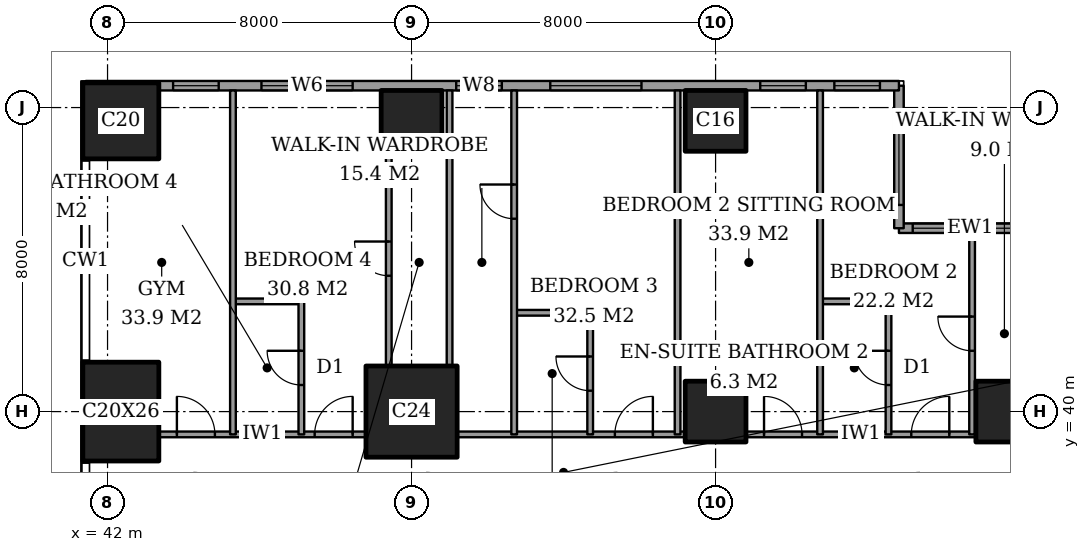
"""IFC4 building model, lengths in metres.
Left out: names, types, materials, properties, quantities, classifications, styles, units other than length and angle.
Written with IfcOpenShell. Run it as: python <this file> out.ifc"""

import sys

from ifc_helpers import new_model, si_unit, direction, frame, frame_2d, origin, origin_2d, place, context, subcontext, project, spatial, rectangle, extrude, element, fill, save


model = new_model("IFC4")
c1 = context("Model", 3, precision=1e-05, world=origin(), true_north=direction((0.0, 1.0)))
c2 = subcontext(c1, "Body", "Model", "MODEL_VIEW")
j1 = project(units=[si_unit("LENGTHUNIT", "METRE"), si_unit("PLANEANGLEUNIT", "RADIAN")], contexts=[c1])
p1 = place(None, origin())
s1 = spatial("IfcSite", under=j1, at=p1, CompositionType="ELEMENT")
p2 = place(p1, origin())
s2 = spatial("IfcBuilding", under=s1, at=p2, CompositionType="ELEMENT")
p3 = place(p2, frame((0.0, 0.0, 252.0)))
s3 = spatial("IfcBuildingStorey", under=s2, at=p3, CompositionType="ELEMENT", Elevation=252.0)
p4 = place(p3, frame((42.35, 40.0, 0.0), z_axis=(0.0, 0.0, 1.0), x_axis=(1.0, 0.0, 0.0)))
e1 = element("IfcColumn", 1, at=p4, inside=s3, PredefinedType="COLUMN", context=c2, shape_type="SweptSolid", body=[
    extrude(rectangle(XDim=2.0, YDim=2.6, at=origin_2d()), origin(), (0.0, 0.0, 1.0), 3.6),
])
p5 = place(p3, frame((42.35, 47.65, 0.0), z_axis=(0.0, 0.0, 1.0), x_axis=(1.0, 0.0, 0.0)))
e2 = element("IfcColumn", 2, at=p5, inside=s3, PredefinedType="COLUMN", context=c2, shape_type="SweptSolid", body=[
    extrude(rectangle(XDim=2.0, YDim=2.0, at=origin_2d()), origin(), (0.0, 0.0, 1.0), 3.6),
])
p6 = place(p3, frame((50.0, 40.0, 0.0), z_axis=(0.0, 0.0, 1.0), x_axis=(1.0, 0.0, 0.0)))
e3 = element("IfcColumn", 3, at=p6, inside=s3, PredefinedType="COLUMN", context=c2, shape_type="SweptSolid", body=[
    extrude(rectangle(XDim=2.4, YDim=2.4, at=origin_2d()), origin(), (0.0, 0.0, 1.0), 3.6),
])
for number, where, z_axis, x_axis in (
    (4, (50.0, 47.65, 0.0), (0.0, 0.0, 1.0), (1.0, 0.0, 0.0)),
    (5, (58.0, 40.0, 0.0), (0.0, 0.0, 1.0), (1.0, 0.0, 0.0)),
    (6, (58.0, 47.65, 0.0), (0.0, 0.0, 1.0), (1.0, 0.0, 0.0)),
    (7, (65.65, 40.0, 0.0), (0.0, 0.0, 1.0), (1.0, 0.0, 0.0)),
):
    element("IfcColumn", number, at=place(p3, frame(where, z_axis=z_axis, x_axis=x_axis)), inside=s3, PredefinedType="COLUMN", context=c2, shape_type="SweptSolid", body=[
        extrude(rectangle(XDim=1.6, YDim=1.6, at=origin_2d()), origin(), (0.0, 0.0, 1.0), 3.6),
    ])
p7 = place(p3, frame((66.575, 44.825, 0.0), z_axis=(0.0, 0.0, 1.0), x_axis=(-1.0, 0.0, 0.0)))
e8 = element("IfcWall", 8, at=p7, inside=s3, PredefinedType="SOLIDWALL", context=c2, shape_type="SweptSolid", body=[
    extrude(rectangle(XDim=3.75, YDim=0.25, at=frame_2d((1.875, 0.0))), origin(), (0.0, 0.0, 1.0), 3.6),
])
p8 = place(p7, frame((0.45, 0.0, 0.6)))
e9 = element("IfcOpeningElement", 9, at=p8, cuts=e8, PredefinedType="OPENING", context=c2, shape_type="SweptSolid", body=[
    extrude(rectangle(XDim=1.2, YDim=2.0, at=frame_2d((0.6, 1.0))), frame((0.0, 0.135, 0.0), z_axis=(0.0, -1.0, 0.0), x_axis=(1.0, 0.0, 0.0)), (0.0, 0.0, 1.0), 0.27),
])
p9 = place(p7, frame((2.188, 0.0, 0.6)))
e10 = element("IfcOpeningElement", 10, at=p9, cuts=e8, PredefinedType="OPENING", context=c2, shape_type="SweptSolid", body=[
    extrude(rectangle(XDim=1.2, YDim=2.0, at=frame_2d((0.6, 1.0))), frame((0.0, 0.135, 0.0), z_axis=(0.0, -1.0, 0.0), x_axis=(1.0, 0.0, 0.0)), (0.0, 0.0, 1.0), 0.27),
])
p10 = place(p3, frame((62.825, 44.825, 0.0), z_axis=(0.0, 0.0, 1.0), x_axis=(0.0, 1.0, 0.0)))
e11 = element("IfcWall", 11, at=p10, inside=s3, PredefinedType="SOLIDWALL", context=c2, shape_type="SweptSolid", body=[
    extrude(rectangle(XDim=3.75, YDim=0.25, at=frame_2d((1.875, 0.0))), origin(), (0.0, 0.0, 1.0), 3.6),
])
p11 = place(p10, frame((0.613, 0.0, 0.6)))
e12 = element("IfcOpeningElement", 12, at=p11, cuts=e11, PredefinedType="OPENING", context=c2, shape_type="SweptSolid", body=[
    extrude(rectangle(XDim=2.4, YDim=2.0, at=frame_2d((1.2, 1.0))), frame((0.0, 0.135, 0.0), z_axis=(0.0, -1.0, 0.0), x_axis=(1.0, 0.0, 0.0)), (0.0, 0.0, 1.0), 0.27),
])
p12 = place(p3, frame((62.825, 48.575, 0.0), z_axis=(0.0, 0.0, 1.0), x_axis=(-1.0, 0.0, 0.0)))
e13 = element("IfcWall", 13, at=p12, inside=s3, PredefinedType="SOLIDWALL", context=c2, shape_type="SweptSolid", body=[
    extrude(rectangle(XDim=21.4, YDim=0.25, at=frame_2d((10.7, 0.0))), origin(), (0.0, 0.0, 1.0), 3.6),
])
p13 = place(p12, frame((0.5, 0.0, 0.6)))
e14 = element("IfcOpeningElement", 14, at=p13, cuts=e13, PredefinedType="OPENING", context=c2, shape_type="SweptSolid", body=[
    extrude(rectangle(XDim=1.2, YDim=2.0, at=frame_2d((0.6, 1.0))), frame((0.0, 0.135, 0.0), z_axis=(0.0, -1.0, 0.0), x_axis=(1.0, 0.0, 0.0)), (0.0, 0.0, 1.0), 0.27),
])
p14 = place(p12, frame((2.45, 0.0, 0.6)))
e15 = element("IfcOpeningElement", 15, at=p14, cuts=e13, PredefinedType="OPENING", context=c2, shape_type="SweptSolid", body=[
    extrude(rectangle(XDim=1.2, YDim=2.0, at=frame_2d((0.6, 1.0))), frame((0.0, 0.135, 0.0), z_axis=(0.0, -1.0, 0.0), x_axis=(1.0, 0.0, 0.0)), (0.0, 0.0, 1.0), 0.27),
])
p15 = place(p12, frame((6.775, 0.0, 0.6)))
e16 = element("IfcOpeningElement", 16, at=p15, cuts=e13, PredefinedType="OPENING", context=c2, shape_type="SweptSolid", body=[
    extrude(rectangle(XDim=2.4, YDim=2.0, at=frame_2d((1.2, 1.0))), frame((0.0, 0.135, 0.0), z_axis=(0.0, -1.0, 0.0), x_axis=(1.0, 0.0, 0.0)), (0.0, 0.0, 1.0), 0.27),
])
p16 = place(p12, frame((10.45, 0.0, 0.6)))
e17 = element("IfcOpeningElement", 17, at=p16, cuts=e13, PredefinedType="OPENING", context=c2, shape_type="SweptSolid", body=[
    extrude(rectangle(XDim=1.2, YDim=2.0, at=frame_2d((0.6, 1.0))), frame((0.0, 0.135, 0.0), z_axis=(0.0, -1.0, 0.0), x_axis=(1.0, 0.0, 0.0)), (0.0, 0.0, 1.0), 0.27),
])
p17 = place(p12, frame((14.375, 0.0, 0.6)))
e18 = element("IfcOpeningElement", 18, at=p17, cuts=e13, PredefinedType="OPENING", context=c2, shape_type="SweptSolid", body=[
    extrude(rectangle(XDim=2.4, YDim=2.0, at=frame_2d((1.2, 1.0))), frame((0.0, 0.135, 0.0), z_axis=(0.0, -1.0, 0.0), x_axis=(1.0, 0.0, 0.0)), (0.0, 0.0, 1.0), 0.27),
])
p18 = place(p12, frame((17.9, 0.0, 0.6)))
e19 = element("IfcOpeningElement", 19, at=p18, cuts=e13, PredefinedType="OPENING", context=c2, shape_type="SweptSolid", body=[
    extrude(rectangle(XDim=1.2, YDim=2.0, at=frame_2d((0.6, 1.0))), frame((0.0, 0.135, 0.0), z_axis=(0.0, -1.0, 0.0), x_axis=(1.0, 0.0, 0.0)), (0.0, 0.0, 1.0), 0.27),
])
p19 = place(p3, frame((43.35, 39.4, 0.0), z_axis=(0.0, 0.0, 1.0), x_axis=(1.0, 0.0, 0.0)))
e20 = element("IfcWall", 20, at=p19, inside=s3, PredefinedType="PARTITIONING", context=c2, shape_type="SweptSolid", body=[
    extrude(rectangle(XDim=5.45, YDim=0.15, at=frame_2d((2.725, 0.0))), origin(), (0.0, 0.0, 1.0), 3.35),
])
p20 = place(p19, frame((4.1, 0.0, 0.0)))
e21 = element("IfcOpeningElement", 21, at=p20, cuts=e20, PredefinedType="OPENING", context=c2, shape_type="SweptSolid", body=[
    extrude(rectangle(XDim=1.0, YDim=2.1, at=frame_2d((0.5, 1.05))), frame((0.0, 0.085, 0.0), z_axis=(0.0, -1.0, 0.0), x_axis=(1.0, 0.0, 0.0)), (0.0, 0.0, 1.0), 0.17),
])
p21 = place(p19, frame((0.475, 0.0, 0.0)))
e22 = element("IfcOpeningElement", 22, at=p21, cuts=e20, PredefinedType="OPENING", context=c2, shape_type="SweptSolid", body=[
    extrude(rectangle(XDim=1.0, YDim=2.1, at=frame_2d((0.5, 1.05))), frame((0.0, 0.085, 0.0), z_axis=(0.0, -1.0, 0.0), x_axis=(1.0, 0.0, 0.0)), (0.0, 0.0, 1.0), 0.17),
])
p22 = place(p3, frame((51.2, 39.4, 0.0), z_axis=(0.0, 0.0, 1.0), x_axis=(1.0, 0.0, 0.0)))
e23 = element("IfcWall", 23, at=p22, inside=s3, PredefinedType="PARTITIONING", context=c2, shape_type="SweptSolid", body=[
    extrude(rectangle(XDim=6.0, YDim=0.15, at=frame_2d((3.0, 0.0))), origin(), (0.0, 0.0, 1.0), 3.35),
])
p23 = place(p22, frame((4.15, 0.0, 0.0)))
e24 = element("IfcOpeningElement", 24, at=p23, cuts=e23, PredefinedType="OPENING", context=c2, shape_type="SweptSolid", body=[
    extrude(rectangle(XDim=1.0, YDim=2.1, at=frame_2d((0.5, 1.05))), frame((0.0, 0.085, 0.0), z_axis=(0.0, -1.0, 0.0), x_axis=(1.0, 0.0, 0.0)), (0.0, 0.0, 1.0), 0.17),
])
p24 = place(p3, frame((58.8, 39.4, 0.0), z_axis=(0.0, 0.0, 1.0), x_axis=(1.0, 0.0, 0.0)))
e25 = element("IfcWall", 25, at=p24, inside=s3, PredefinedType="PARTITIONING", context=c2, shape_type="SweptSolid", body=[
    extrude(rectangle(XDim=6.05, YDim=0.15, at=frame_2d((3.025, 0.0))), origin(), (0.0, 0.0, 1.0), 3.35),
])
p25 = place(p24, frame((4.35, 0.0, 0.0)))
e26 = element("IfcOpeningElement", 26, at=p25, cuts=e25, PredefinedType="OPENING", context=c2, shape_type="SweptSolid", body=[
    extrude(rectangle(XDim=1.0, YDim=2.1, at=frame_2d((0.5, 1.05))), frame((0.0, 0.085, 0.0), z_axis=(0.0, -1.0, 0.0), x_axis=(1.0, 0.0, 0.0)), (0.0, 0.0, 1.0), 0.17),
])
p26 = place(p24, frame((0.475, 0.0, 0.0)))
e27 = element("IfcOpeningElement", 27, at=p26, cuts=e25, PredefinedType="OPENING", context=c2, shape_type="SweptSolid", body=[
    extrude(rectangle(XDim=1.0, YDim=2.1, at=frame_2d((0.5, 1.05))), frame((0.0, 0.085, 0.0), z_axis=(0.0, -1.0, 0.0), x_axis=(1.0, 0.0, 0.0)), (0.0, 0.0, 1.0), 0.17),
])
p27 = place(p3, frame((52.7, 42.6, 0.0), z_axis=(0.0, 0.0, 1.0), x_axis=(1.0, 0.0, 0.0)))
e28 = element("IfcWall", 28, at=p27, inside=s3, PredefinedType="PARTITIONING", context=c2, shape_type="SweptSolid", body=[
    extrude(rectangle(XDim=2.0, YDim=0.15, at=frame_2d((1.0, 0.0))), origin(), (0.0, 0.0, 1.0), 3.35),
])
for number, where, z_axis, x_axis in (
    (29, (45.3, 42.9, 0.0), (0.0, 0.0, 1.0), (1.0, 0.0, 0.0)),
    (30, (60.75, 42.9, 0.0), (0.0, 0.0, 1.0), (1.0, 0.0, 0.0)),
):
    element("IfcWall", number, at=place(p3, frame(where, z_axis=z_axis, x_axis=x_axis)), inside=s3, PredefinedType="PARTITIONING", context=c2, shape_type="SweptSolid", body=[
        extrude(rectangle(XDim=1.8, YDim=0.15, at=frame_2d((0.9, 0.0))), origin(), (0.0, 0.0, 1.0), 3.35),
    ])
p28 = place(p3, frame((45.3, 39.4, 0.0), z_axis=(0.0, 0.0, 1.0), x_axis=(0.0, 1.0, 0.0)))
e31 = element("IfcWall", 31, at=p28, inside=s3, PredefinedType="PARTITIONING", context=c2, shape_type="SweptSolid", body=[
    extrude(rectangle(XDim=9.05, YDim=0.15, at=frame_2d((4.525, 0.0))), origin(), (0.0, 0.0, 1.0), 3.35),
])
p29 = place(p3, frame((47.1, 39.4, 0.0), z_axis=(0.0, 0.0, 1.0), x_axis=(0.0, 1.0, 0.0)))
e32 = element("IfcWall", 32, at=p29, inside=s3, PredefinedType="PARTITIONING", context=c2, shape_type="SweptSolid", body=[
    extrude(rectangle(XDim=3.5, YDim=0.15, at=frame_2d((1.75, 0.0))), origin(), (0.0, 0.0, 1.0), 3.35),
])
p30 = place(p29, frame((1.3, 0.0, 0.0)))
e33 = element("IfcOpeningElement", 33, at=p30, cuts=e32, PredefinedType="OPENING", context=c2, shape_type="SweptSolid", body=[
    extrude(rectangle(XDim=0.9, YDim=2.1, at=frame_2d((0.45, 1.05))), frame((0.0, 0.085, 0.0), z_axis=(0.0, -1.0, 0.0), x_axis=(1.0, 0.0, 0.0)), (0.0, 0.0, 1.0), 0.17),
])
p31 = place(p3, frame((49.4, 41.2, 0.0), z_axis=(0.0, 0.0, 1.0), x_axis=(0.0, 1.0, 0.0)))
e34 = element("IfcWall", 34, at=p31, inside=s3, PredefinedType="PARTITIONING", context=c2, shape_type="SweptSolid", body=[
    extrude(rectangle(XDim=5.65, YDim=0.15, at=frame_2d((2.825, 0.0))), origin(), (0.0, 0.0, 1.0), 3.35),
])
p32 = place(p31, frame((2.375, 0.0, 0.0)))
e35 = element("IfcOpeningElement", 35, at=p32, cuts=e34, PredefinedType="OPENING", context=c2, shape_type="SweptSolid", body=[
    extrude(rectangle(XDim=0.9, YDim=2.1, at=frame_2d((0.45, 1.05))), frame((0.0, 0.085, 0.0), z_axis=(0.0, -1.0, 0.0), x_axis=(1.0, 0.0, 0.0)), (0.0, 0.0, 1.0), 0.17),
])
p33 = place(p3, frame((51.0, 41.2, 0.0), z_axis=(0.0, 0.0, 1.0), x_axis=(0.0, 1.0, 0.0)))
e36 = element("IfcWall", 36, at=p33, inside=s3, PredefinedType="PARTITIONING", context=c2, shape_type="SweptSolid", body=[
    extrude(rectangle(XDim=7.25, YDim=0.15, at=frame_2d((3.625, 0.0))), origin(), (0.0, 0.0, 1.0), 3.35),
])
p34 = place(p3, frame((52.7, 39.4, 0.0), z_axis=(0.0, 0.0, 1.0), x_axis=(0.0, 1.0, 0.0)))
e37 = element("IfcWall", 37, at=p34, inside=s3, PredefinedType="PARTITIONING", context=c2, shape_type="SweptSolid", body=[
    extrude(rectangle(XDim=9.05, YDim=0.15, at=frame_2d((4.525, 0.0))), origin(), (0.0, 0.0, 1.0), 3.35),
])
p35 = place(p34, frame((5.675, 0.0, 0.0)))
e38 = element("IfcOpeningElement", 38, at=p35, cuts=e37, PredefinedType="OPENING", context=c2, shape_type="SweptSolid", body=[
    extrude(rectangle(XDim=0.9, YDim=2.1, at=frame_2d((0.45, 1.05))), frame((0.0, 0.085, 0.0), z_axis=(0.0, -1.0, 0.0), x_axis=(1.0, 0.0, 0.0)), (0.0, 0.0, 1.0), 0.17),
])
p36 = place(p3, frame((54.7, 39.4, 0.0), z_axis=(0.0, 0.0, 1.0), x_axis=(0.0, 1.0, 0.0)))
e39 = element("IfcWall", 39, at=p36, inside=s3, PredefinedType="PARTITIONING", context=c2, shape_type="SweptSolid", body=[
    extrude(rectangle(XDim=3.2, YDim=0.15, at=frame_2d((1.6, 0.0))), origin(), (0.0, 0.0, 1.0), 3.35),
])
p37 = place(p36, frame((1.15, 0.0, 0.0)))
e40 = element("IfcOpeningElement", 40, at=p37, cuts=e39, PredefinedType="OPENING", context=c2, shape_type="SweptSolid", body=[
    extrude(rectangle(XDim=0.9, YDim=2.1, at=frame_2d((0.45, 1.05))), frame((0.0, 0.085, 0.0), z_axis=(0.0, -1.0, 0.0), x_axis=(1.0, 0.0, 0.0)), (0.0, 0.0, 1.0), 0.17),
])
for number, where, z_axis, x_axis in (
    (41, (57.0, 39.4, 0.0), (0.0, 0.0, 1.0), (0.0, 1.0, 0.0)),
    (42, (60.75, 39.4, 0.0), (0.0, 0.0, 1.0), (0.0, 1.0, 0.0)),
):
    element("IfcWall", number, at=place(p3, frame(where, z_axis=z_axis, x_axis=x_axis)), inside=s3, PredefinedType="PARTITIONING", context=c2, shape_type="SweptSolid", body=[
        extrude(rectangle(XDim=9.05, YDim=0.15, at=frame_2d((4.525, 0.0))), origin(), (0.0, 0.0, 1.0), 3.35),
    ])
p38 = place(p3, frame((62.55, 39.4, 0.0), z_axis=(0.0, 0.0, 1.0), x_axis=(0.0, 1.0, 0.0)))
e43 = element("IfcWall", 43, at=p38, inside=s3, PredefinedType="PARTITIONING", context=c2, shape_type="SweptSolid", body=[
    extrude(rectangle(XDim=3.5, YDim=0.15, at=frame_2d((1.75, 0.0))), origin(), (0.0, 0.0, 1.0), 3.35),
])
p39 = place(p38, frame((1.3, 0.0, 0.0)))
e44 = element("IfcOpeningElement", 44, at=p39, cuts=e43, PredefinedType="OPENING", context=c2, shape_type="SweptSolid", body=[
    extrude(rectangle(XDim=0.9, YDim=2.1, at=frame_2d((0.45, 1.05))), frame((0.0, 0.085, 0.0), z_axis=(0.0, -1.0, 0.0), x_axis=(1.0, 0.0, 0.0)), (0.0, 0.0, 1.0), 0.17),
])
p40 = place(p3, frame((64.75, 39.4, 0.0), z_axis=(0.0, 0.0, 1.0), x_axis=(0.0, 1.0, 0.0)))
e45 = element("IfcWall", 45, at=p40, inside=s3, PredefinedType="PARTITIONING", context=c2, shape_type="SweptSolid", body=[
    extrude(rectangle(XDim=5.3, YDim=0.15, at=frame_2d((2.65, 0.0))), origin(), (0.0, 0.0, 1.0), 3.35),
])
p41 = place(p40, frame((2.2, 0.0, 0.0)))
e46 = element("IfcOpeningElement", 46, at=p41, cuts=e45, PredefinedType="OPENING", context=c2, shape_type="SweptSolid", body=[
    extrude(rectangle(XDim=0.9, YDim=2.1, at=frame_2d((0.45, 1.05))), frame((0.0, 0.085, 0.0), z_axis=(0.0, -1.0, 0.0), x_axis=(1.0, 0.0, 0.0)), (0.0, 0.0, 1.0), 0.17),
])
p42 = place(p8, origin())
e47 = element("IfcWindow", 47, at=p42, inside=s3, PartitioningType="SINGLE_PANEL", PredefinedType="WINDOW", context=c2, shape_type="SweptSolid", body=[
    extrude(rectangle(XDim=1.2, YDim=2.0, at=frame_2d((0.6, 1.0))), frame((0.0, 0.03, 0.0), z_axis=(0.0, -1.0, 0.0), x_axis=(1.0, 0.0, 0.0)), (0.0, 0.0, 1.0), 0.06),
])
fill(e9, e47)
p43 = place(p9, origin())
e48 = element("IfcWindow", 48, at=p43, inside=s3, PartitioningType="SINGLE_PANEL", PredefinedType="WINDOW", context=c2, shape_type="SweptSolid", body=[
    extrude(rectangle(XDim=1.2, YDim=2.0, at=frame_2d((0.6, 1.0))), frame((0.0, 0.03, 0.0), z_axis=(0.0, -1.0, 0.0), x_axis=(1.0, 0.0, 0.0)), (0.0, 0.0, 1.0), 0.06),
])
fill(e10, e48)
p44 = place(p11, origin())
e49 = element("IfcWindow", 49, at=p44, inside=s3, PartitioningType="SINGLE_PANEL", PredefinedType="WINDOW", context=c2, shape_type="SweptSolid", body=[
    extrude(rectangle(XDim=2.4, YDim=2.0, at=frame_2d((1.2, 1.0))), frame((0.0, 0.03, 0.0), z_axis=(0.0, -1.0, 0.0), x_axis=(1.0, 0.0, 0.0)), (0.0, 0.0, 1.0), 0.06),
])
fill(e12, e49)
p45 = place(p13, origin())
e50 = element("IfcWindow", 50, at=p45, inside=s3, PartitioningType="SINGLE_PANEL", PredefinedType="WINDOW", context=c2, shape_type="SweptSolid", body=[
    extrude(rectangle(XDim=1.2, YDim=2.0, at=frame_2d((0.6, 1.0))), frame((0.0, 0.03, 0.0), z_axis=(0.0, -1.0, 0.0), x_axis=(1.0, 0.0, 0.0)), (0.0, 0.0, 1.0), 0.06),
])
fill(e14, e50)
p46 = place(p14, origin())
e51 = element("IfcWindow", 51, at=p46, inside=s3, PartitioningType="SINGLE_PANEL", PredefinedType="WINDOW", context=c2, shape_type="SweptSolid", body=[
    extrude(rectangle(XDim=1.2, YDim=2.0, at=frame_2d((0.6, 1.0))), frame((0.0, 0.03, 0.0), z_axis=(0.0, -1.0, 0.0), x_axis=(1.0, 0.0, 0.0)), (0.0, 0.0, 1.0), 0.06),
])
fill(e15, e51)
p47 = place(p15, origin())
e52 = element("IfcWindow", 52, at=p47, inside=s3, PartitioningType="SINGLE_PANEL", PredefinedType="WINDOW", context=c2, shape_type="SweptSolid", body=[
    extrude(rectangle(XDim=2.4, YDim=2.0, at=frame_2d((1.2, 1.0))), frame((0.0, 0.03, 0.0), z_axis=(0.0, -1.0, 0.0), x_axis=(1.0, 0.0, 0.0)), (0.0, 0.0, 1.0), 0.06),
])
fill(e16, e52)
p48 = place(p16, origin())
e53 = element("IfcWindow", 53, at=p48, inside=s3, PartitioningType="SINGLE_PANEL", PredefinedType="WINDOW", context=c2, shape_type="SweptSolid", body=[
    extrude(rectangle(XDim=1.2, YDim=2.0, at=frame_2d((0.6, 1.0))), frame((0.0, 0.03, 0.0), z_axis=(0.0, -1.0, 0.0), x_axis=(1.0, 0.0, 0.0)), (0.0, 0.0, 1.0), 0.06),
])
fill(e17, e53)
p49 = place(p17, origin())
e54 = element("IfcWindow", 54, at=p49, inside=s3, PartitioningType="SINGLE_PANEL", PredefinedType="WINDOW", context=c2, shape_type="SweptSolid", body=[
    extrude(rectangle(XDim=2.4, YDim=2.0, at=frame_2d((1.2, 1.0))), frame((0.0, 0.03, 0.0), z_axis=(0.0, -1.0, 0.0), x_axis=(1.0, 0.0, 0.0)), (0.0, 0.0, 1.0), 0.06),
])
fill(e18, e54)
p50 = place(p18, origin())
e55 = element("IfcWindow", 55, at=p50, inside=s3, PartitioningType="SINGLE_PANEL", PredefinedType="WINDOW", context=c2, shape_type="SweptSolid", body=[
    extrude(rectangle(XDim=1.2, YDim=2.0, at=frame_2d((0.6, 1.0))), frame((0.0, 0.03, 0.0), z_axis=(0.0, -1.0, 0.0), x_axis=(1.0, 0.0, 0.0)), (0.0, 0.0, 1.0), 0.06),
])
fill(e19, e55)
p51 = place(p41, origin())
e56 = element("IfcDoor", 56, at=p51, inside=s3, OperationType="SINGLE_SWING_LEFT", PredefinedType="DOOR", context=c2, shape_type="SweptSolid", body=[
    extrude(rectangle(XDim=0.9, YDim=2.1, at=frame_2d((0.45, 1.05))), frame((0.0, 0.025, 0.0), z_axis=(0.0, -1.0, 0.0), x_axis=(1.0, 0.0, 0.0)), (0.0, 0.0, 1.0), 0.05),
])
fill(e46, e56)
p52 = place(p39, origin())
e57 = element("IfcDoor", 57, at=p52, inside=s3, OperationType="SINGLE_SWING_LEFT", PredefinedType="DOOR", context=c2, shape_type="SweptSolid", body=[
    extrude(rectangle(XDim=0.9, YDim=2.1, at=frame_2d((0.45, 1.05))), frame((0.0, 0.025, 0.0), z_axis=(0.0, -1.0, 0.0), x_axis=(1.0, 0.0, 0.0)), (0.0, 0.0, 1.0), 0.05),
])
fill(e44, e57)
p53 = place(p25, origin())
e58 = element("IfcDoor", 58, at=p53, inside=s3, OperationType="SINGLE_SWING_LEFT", PredefinedType="DOOR", context=c2, shape_type="SweptSolid", body=[
    extrude(rectangle(XDim=1.0, YDim=2.1, at=frame_2d((0.5, 1.05))), frame((0.0, 0.025, 0.0), z_axis=(0.0, -1.0, 0.0), x_axis=(1.0, 0.0, 0.0)), (0.0, 0.0, 1.0), 0.05),
])
fill(e26, e58)
p54 = place(p26, origin())
e59 = element("IfcDoor", 59, at=p54, inside=s3, OperationType="SINGLE_SWING_RIGHT", PredefinedType="DOOR", context=c2, shape_type="SweptSolid", body=[
    extrude(rectangle(XDim=1.0, YDim=2.1, at=frame_2d((0.5, 1.05))), frame((0.0, 0.025, 0.0), z_axis=(0.0, -1.0, 0.0), x_axis=(1.0, 0.0, 0.0)), (0.0, 0.0, 1.0), 0.05),
])
fill(e27, e59)
p55 = place(p37, origin())
e60 = element("IfcDoor", 60, at=p55, inside=s3, OperationType="SINGLE_SWING_LEFT", PredefinedType="DOOR", context=c2, shape_type="SweptSolid", body=[
    extrude(rectangle(XDim=0.9, YDim=2.1, at=frame_2d((0.45, 1.05))), frame((0.0, 0.025, 0.0), z_axis=(0.0, -1.0, 0.0), x_axis=(1.0, 0.0, 0.0)), (0.0, 0.0, 1.0), 0.05),
])
fill(e40, e60)
p56 = place(p23, origin())
e61 = element("IfcDoor", 61, at=p56, inside=s3, OperationType="SINGLE_SWING_LEFT", PredefinedType="DOOR", context=c2, shape_type="SweptSolid", body=[
    extrude(rectangle(XDim=1.0, YDim=2.1, at=frame_2d((0.5, 1.05))), frame((0.0, 0.025, 0.0), z_axis=(0.0, -1.0, 0.0), x_axis=(1.0, 0.0, 0.0)), (0.0, 0.0, 1.0), 0.05),
])
fill(e24, e61)
p57 = place(p35, origin())
e62 = element("IfcDoor", 62, at=p57, inside=s3, OperationType="SINGLE_SWING_LEFT", PredefinedType="DOOR", context=c2, shape_type="SweptSolid", body=[
    extrude(rectangle(XDim=0.9, YDim=2.1, at=frame_2d((0.45, 1.05))), frame((0.0, 0.025, 0.0), z_axis=(0.0, -1.0, 0.0), x_axis=(1.0, 0.0, 0.0)), (0.0, 0.0, 1.0), 0.05),
])
fill(e38, e62)
p58 = place(p32, origin())
e63 = element("IfcDoor", 63, at=p58, inside=s3, OperationType="SINGLE_SWING_LEFT", PredefinedType="DOOR", context=c2, shape_type="SweptSolid", body=[
    extrude(rectangle(XDim=0.9, YDim=2.1, at=frame_2d((0.45, 1.05))), frame((0.0, 0.025, 0.0), z_axis=(0.0, -1.0, 0.0), x_axis=(1.0, 0.0, 0.0)), (0.0, 0.0, 1.0), 0.05),
])
fill(e35, e63)
p59 = place(p30, origin())
e64 = element("IfcDoor", 64, at=p59, inside=s3, OperationType="SINGLE_SWING_LEFT", PredefinedType="DOOR", context=c2, shape_type="SweptSolid", body=[
    extrude(rectangle(XDim=0.9, YDim=2.1, at=frame_2d((0.45, 1.05))), frame((0.0, 0.025, 0.0), z_axis=(0.0, -1.0, 0.0), x_axis=(1.0, 0.0, 0.0)), (0.0, 0.0, 1.0), 0.05),
])
fill(e33, e64)
p60 = place(p20, origin())
e65 = element("IfcDoor", 65, at=p60, inside=s3, OperationType="SINGLE_SWING_LEFT", PredefinedType="DOOR", context=c2, shape_type="SweptSolid", body=[
    extrude(rectangle(XDim=1.0, YDim=2.1, at=frame_2d((0.5, 1.05))), frame((0.0, 0.025, 0.0), z_axis=(0.0, -1.0, 0.0), x_axis=(1.0, 0.0, 0.0)), (0.0, 0.0, 1.0), 0.05),
])
fill(e21, e65)
p61 = place(p21, origin())
e66 = element("IfcDoor", 66, at=p61, inside=s3, OperationType="SINGLE_SWING_RIGHT", PredefinedType="DOOR", context=c2, shape_type="SweptSolid", body=[
    extrude(rectangle(XDim=1.0, YDim=2.1, at=frame_2d((0.5, 1.05))), frame((0.0, 0.025, 0.0), z_axis=(0.0, -1.0, 0.0), x_axis=(1.0, 0.0, 0.0)), (0.0, 0.0, 1.0), 0.05),
])
fill(e22, e66)
save(model, sys.argv[1])
